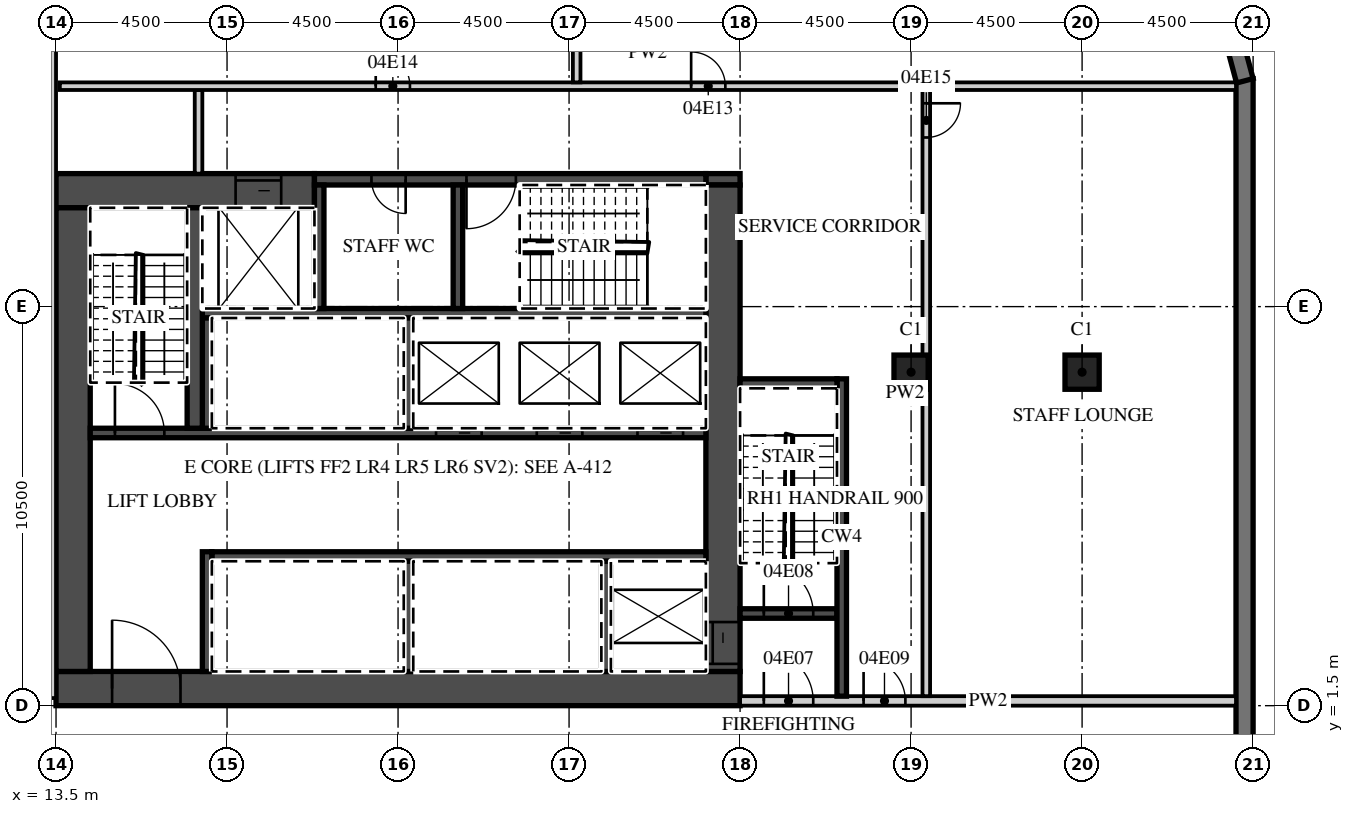
"""IFC4 building model, lengths in metres.
Left out: names, types, materials, properties, quantities, classifications, styles, units other than length and angle.
Written with IfcOpenShell. Run it as: python <this file> out.ifc"""

import sys

from ifc_helpers import new_model, si_unit, direction, frame, frame_2d, origin, origin_2d, place, context, subcontext, project, spatial, polyline, rectangle, outline, extrude, element, fill, save


model = new_model("IFC4")
c1 = context("Model", 3, precision=1e-05, world=origin(), true_north=direction((0.0, 1.0)))
c2 = subcontext(c1, "Body", "Model", "MODEL_VIEW")
j1 = project(units=[si_unit("LENGTHUNIT", "METRE"), si_unit("PLANEANGLEUNIT", "RADIAN")], contexts=[c1])
p1 = place(None, origin())
s1 = spatial("IfcSite", under=j1, at=p1, CompositionType="ELEMENT")
p2 = place(p1, origin())
s2 = spatial("IfcBuilding", under=s1, at=p2, CompositionType="ELEMENT")
p3 = place(p2, frame((0.0, 0.0, 29.0)))
s3 = spatial("IfcBuildingStorey", under=s2, at=p3, CompositionType="ELEMENT", Elevation=29.0)
for number, where, z_axis, x_axis in (
    (1, (36.0, 10.275, 0.0), (0.0, 0.0, 1.0), (1.0, 0.0, 0.0)),
    (2, (40.5, 10.275, 0.0), (0.0, 0.0, 1.0), (1.0, 0.0, 0.0)),
):
    element("IfcColumn", number, at=place(p3, frame(where, z_axis=z_axis, x_axis=x_axis)), inside=s3, PredefinedType="COLUMN", context=c2, shape_type="SweptSolid", body=[
        extrude(rectangle(XDim=0.9, YDim=0.9, at=origin_2d()), origin(), (0.0, 0.0, 1.0), 4.5),
    ])
p4 = place(p3, frame((44.775, -18.0, 0.0), z_axis=(0.0, 0.0, 1.0), x_axis=(0.0, 1.0, 0.0)))
e3 = element("IfcWall", 3, at=p4, inside=s3, PredefinedType="SOLIDWALL", context=c2, shape_type="SweptSolid", body=[
    extrude(rectangle(XDim=36.0, YDim=0.45, at=frame_2d((18.0, 0.0))), origin(), (0.0, 0.0, 1.0), 4.05),
])
p5 = place(p4, frame((4.05, 0.0, 0.9)))
e4 = element("IfcOpeningElement", 4, at=p5, cuts=e3, PredefinedType="OPENING", context=c2, shape_type="SweptSolid", body=[
    extrude(rectangle(XDim=3.0, YDim=1.8, at=frame_2d((1.5, 0.9))), frame((0.0, 0.235, 0.0), z_axis=(0.0, -1.0, 0.0), x_axis=(1.0, 0.0, 0.0)), (0.0, 0.0, 1.0), 0.47),
])
p6 = place(p3, frame((44.783, 17.942, 0.0), z_axis=(0.0, 0.0, 1.0), x_axis=(-0.25881466832, 0.965926999034, 0.0)))
e5 = element("IfcWall", 5, at=p6, inside=s3, PredefinedType="SOLIDWALL", context=c2, shape_type="SweptSolid", body=[
    extrude(outline(polyline([(0.0, -0.225), (2.071, -0.225), (1.95, 0.225), (0.121, 0.225), (0.0, -0.225)])), origin(), (0.0, 0.0, 1.0), 4.05),
])
p7 = place(p3, frame((13.5, 1.95, 0.0), z_axis=(0.0, 0.0, 1.0), x_axis=(1.0, 0.0, 0.0)))
e6 = element("IfcWall", 6, at=p7, inside=s3, PredefinedType="SHEAR", context=c2, shape_type="SweptSolid", body=[
    extrude(rectangle(XDim=18.0, YDim=0.9, at=frame_2d((9.0, 0.0))), origin(), (0.0, 0.0, 1.0), 4.05),
])
p8 = place(p7, frame((1.475, 0.0, 0.0)))
e7 = element("IfcOpeningElement", 7, at=p8, cuts=e6, PredefinedType="OPENING", context=c2, shape_type="SweptSolid", body=[
    extrude(rectangle(XDim=1.8, YDim=2.1, at=frame_2d((0.9, 1.05))), frame((0.0, 0.46, 0.0), z_axis=(0.0, -1.0, 0.0), x_axis=(1.0, 0.0, 0.0)), (0.0, 0.0, 1.0), 0.92),
])
p9 = place(p3, frame((13.5, 15.05, 0.0), z_axis=(0.0, 0.0, 1.0), x_axis=(1.0, 0.0, 0.0)))
e8 = element("IfcWall", 8, at=p9, inside=s3, PredefinedType="SHEAR", context=c2, shape_type="SweptSolid", body=[
    extrude(rectangle(XDim=6.8, YDim=0.9, at=frame_2d((3.4, 0.0))), origin(), (0.0, 0.0, 1.0), 4.05),
])
p10 = place(p9, frame((4.725, 0.0, 0.0)))
e9 = element("IfcOpeningElement", 9, at=p10, cuts=e8, PredefinedType="OPENING", context=c2, shape_type="SweptSolid", body=[
    extrude(rectangle(XDim=1.2, YDim=2.1, at=frame_2d((0.6, 1.05))), frame((0.0, 0.46, 0.0), z_axis=(0.0, -1.0, 0.0), x_axis=(1.0, 0.0, 0.0)), (0.0, 0.0, 1.0), 0.92),
])
p11 = place(p3, frame((30.6, 15.35, 0.0), z_axis=(0.0, 0.0, 1.0), x_axis=(1.0, 0.0, 0.0)))
e10 = element("IfcWall", 10, at=p11, inside=s3, PredefinedType="SHEAR", context=c2, shape_type="SweptSolid", body=[
    extrude(rectangle(XDim=0.9, YDim=0.3, at=frame_2d((0.45, 0.0))), origin(), (0.0, 0.0, 1.0), 4.05),
])
p12 = place(p3, frame((20.3, 15.35, 0.0), z_axis=(0.0, 0.0, 1.0), x_axis=(1.0, 0.0, 0.0)))
e11 = element("IfcWall", 11, at=p12, inside=s3, PredefinedType="SHEAR", context=c2, shape_type="SweptSolid", body=[
    extrude(rectangle(XDim=10.3, YDim=0.3, at=frame_2d((5.15, 0.0))), origin(), (0.0, 0.0, 1.0), 4.05),
])
p13 = place(p12, frame((4.0, 0.0, 0.0)))
e12 = element("IfcOpeningElement", 12, at=p13, cuts=e11, PredefinedType="OPENING", context=c2, shape_type="SweptSolid", body=[
    extrude(rectangle(XDim=1.3, YDim=2.1, at=frame_2d((0.65, 1.05))), frame((0.0, 0.16, 0.0), z_axis=(0.0, -1.0, 0.0), x_axis=(1.0, 0.0, 0.0)), (0.0, 0.0, 1.0), 0.32),
])
p14 = place(p12, frame((1.5, 0.0, 0.0)))
e13 = element("IfcOpeningElement", 13, at=p14, cuts=e11, PredefinedType="OPENING", context=c2, shape_type="SweptSolid", body=[
    extrude(rectangle(XDim=0.9, YDim=2.1, at=frame_2d((0.45, 1.05))), frame((0.0, 0.16, 0.0), z_axis=(0.0, -1.0, 0.0), x_axis=(1.0, 0.0, 0.0)), (0.0, 0.0, 1.0), 0.32),
])
p15 = place(p3, frame((31.05, 2.4, 0.0), z_axis=(0.0, 0.0, 1.0), x_axis=(0.0, 1.0, 0.0)))
e14 = element("IfcWall", 14, at=p15, inside=s3, PredefinedType="SHEAR", context=c2, shape_type="SweptSolid", body=[
    extrude(rectangle(XDim=12.8, YDim=0.9, at=frame_2d((6.4, 0.0))), origin(), (0.0, 0.0, 1.0), 4.05),
])
p16 = place(p15, frame((0.2, 0.0, 0.0)))
e15 = element("IfcOpeningElement", 15, at=p16, cuts=e14, PredefinedType="OPENING", context=c2, shape_type="SweptSolid", body=[
    extrude(rectangle(XDim=1.1, YDim=2.1, at=frame_2d((0.55, 1.05))), frame((0.0, 0.46, 0.0), z_axis=(0.0, -1.0, 0.0), x_axis=(1.0, 0.0, 0.0)), (0.0, 0.0, 1.0), 0.92),
])
p17 = place(p3, frame((13.95, 2.4, 0.0), z_axis=(0.0, 0.0, 1.0), x_axis=(0.0, 1.0, 0.0)))
e16 = element("IfcWall", 16, at=p17, inside=s3, PredefinedType="SHEAR", context=c2, shape_type="SweptSolid", body=[
    extrude(rectangle(XDim=12.2, YDim=0.9, at=frame_2d((6.1, 0.0))), origin(), (0.0, 0.0, 1.0), 4.05),
])
p18 = place(p3, frame((17.6, 5.425, 0.0), z_axis=(0.0, 0.0, 1.0), x_axis=(1.0, 0.0, 0.0)))
e17 = element("IfcWall", 17, at=p18, inside=s3, PredefinedType="SHEAR", context=c2, shape_type="SweptSolid", body=[
    extrude(rectangle(XDim=13.0, YDim=0.25, at=frame_2d((6.5, 0.0))), origin(), (0.0, 0.0, 1.0), 4.05),
])
p19 = place(p3, frame((17.475, 2.4, 0.0), z_axis=(0.0, 0.0, 1.0), x_axis=(0.0, 1.0, 0.0)))
e18 = element("IfcWall", 18, at=p19, inside=s3, PredefinedType="SHEAR", context=c2, shape_type="SweptSolid", body=[
    extrude(rectangle(XDim=3.15, YDim=0.25, at=frame_2d((1.575, 0.0))), origin(), (0.0, 0.0, 1.0), 4.05),
])
for number, where, z_axis, x_axis in (
    (19, (27.975, 2.4, 0.0), (0.0, 0.0, 1.0), (0.0, 1.0, 0.0)),
    (20, (22.775, 2.4, 0.0), (0.0, 0.0, 1.0), (0.0, 1.0, 0.0)),
):
    element("IfcWall", number, at=place(p3, frame(where, z_axis=z_axis, x_axis=x_axis)), inside=s3, PredefinedType="SHEAR", context=c2, shape_type="SweptSolid", body=[
        extrude(rectangle(XDim=2.9, YDim=0.25, at=frame_2d((1.45, 0.0))), origin(), (0.0, 0.0, 1.0), 4.05),
    ])
p20 = place(p3, frame((14.4, 8.675, 0.0), z_axis=(0.0, 0.0, 1.0), x_axis=(1.0, 0.0, 0.0)))
e21 = element("IfcWall", 21, at=p20, inside=s3, PredefinedType="SHEAR", context=c2, shape_type="SweptSolid", body=[
    extrude(rectangle(XDim=16.2, YDim=0.25, at=frame_2d((8.1, 0.0))), origin(), (0.0, 0.0, 1.0), 4.05),
])
p21 = place(p20, frame((14.4, 0.0, 0.0)))
e22 = element("IfcOpeningElement", 22, at=p21, cuts=e21, PredefinedType="OPENING", context=c2, shape_type="SweptSolid", body=[
    extrude(rectangle(XDim=1.2, YDim=2.1, at=frame_2d((0.6, 1.05))), frame((0.0, 0.135, 0.0), z_axis=(0.0, -1.0, 0.0), x_axis=(1.0, 0.0, 0.0)), (0.0, 0.0, 1.0), 0.27),
])
p22 = place(p20, frame((11.75, 0.0, 0.0)))
e23 = element("IfcOpeningElement", 23, at=p22, cuts=e21, PredefinedType="OPENING", context=c2, shape_type="SweptSolid", body=[
    extrude(rectangle(XDim=1.2, YDim=2.1, at=frame_2d((0.6, 1.05))), frame((0.0, 0.135, 0.0), z_axis=(0.0, -1.0, 0.0), x_axis=(1.0, 0.0, 0.0)), (0.0, 0.0, 1.0), 0.27),
])
p23 = place(p20, frame((9.1, 0.0, 0.0)))
e24 = element("IfcOpeningElement", 24, at=p23, cuts=e21, PredefinedType="OPENING", context=c2, shape_type="SweptSolid", body=[
    extrude(rectangle(XDim=1.2, YDim=2.1, at=frame_2d((0.6, 1.05))), frame((0.0, 0.135, 0.0), z_axis=(0.0, -1.0, 0.0), x_axis=(1.0, 0.0, 0.0)), (0.0, 0.0, 1.0), 0.27),
])
p24 = place(p20, frame((0.65, 0.0, 0.0)))
e25 = element("IfcOpeningElement", 25, at=p24, cuts=e21, PredefinedType="OPENING", context=c2, shape_type="SweptSolid", body=[
    extrude(rectangle(XDim=1.3, YDim=2.1, at=frame_2d((0.65, 1.05))), frame((0.0, 0.135, 0.0), z_axis=(0.0, -1.0, 0.0), x_axis=(1.0, 0.0, 0.0)), (0.0, 0.0, 1.0), 0.27),
])
p25 = place(p3, frame((17.35, 11.825, 0.0), z_axis=(0.0, 0.0, 1.0), x_axis=(1.0, 0.0, 0.0)))
e26 = element("IfcWall", 26, at=p25, inside=s3, PredefinedType="SHEAR", context=c2, shape_type="SweptSolid", body=[
    extrude(rectangle(XDim=13.25, YDim=0.25, at=frame_2d((6.625, 0.0))), origin(), (0.0, 0.0, 1.0), 4.05),
])
for number, where, z_axis, x_axis in (
    (27, (17.475, 8.8, 0.0), (0.0, 0.0, 1.0), (0.0, 1.0, 0.0)),
    (28, (22.775, 8.8, 0.0), (0.0, 0.0, 1.0), (0.0, 1.0, 0.0)),
):
    element("IfcWall", number, at=place(p3, frame(where, z_axis=z_axis, x_axis=x_axis)), inside=s3, PredefinedType="SHEAR", context=c2, shape_type="SweptSolid", body=[
        extrude(rectangle(XDim=2.9, YDim=0.25, at=frame_2d((1.45, 0.0))), origin(), (0.0, 0.0, 1.0), 4.05),
    ])
p26 = place(p3, frame((17.15, 8.8, 0.0), z_axis=(0.0, 0.0, 1.0), x_axis=(0.0, 1.0, 0.0)))
e29 = element("IfcWall", 29, at=p26, inside=s3, PredefinedType="SHEAR", context=c2, shape_type="SweptSolid", body=[
    extrude(rectangle(XDim=5.8, YDim=0.4, at=frame_2d((2.9, 0.0))), origin(), (0.0, 0.0, 1.0), 4.05),
])
for number, where, z_axis, x_axis in (
    (30, (20.425, 11.95, 0.0), (0.0, 0.0, 1.0), (0.0, 1.0, 0.0)),
    (31, (24.075, 11.95, 0.0), (0.0, 0.0, 1.0), (0.0, 1.0, 0.0)),
):
    element("IfcWall", number, at=place(p3, frame(where, z_axis=z_axis, x_axis=x_axis)), inside=s3, PredefinedType="SHEAR", context=c2, shape_type="SweptSolid", body=[
        extrude(rectangle(XDim=3.25, YDim=0.25, at=frame_2d((1.625, 0.0))), origin(), (0.0, 0.0, 1.0), 4.05),
    ])
p27 = place(p3, frame((31.5, 1.625, 0.0), z_axis=(0.0, 0.0, 1.0), x_axis=(1.0, 0.0, 0.0)))
e32 = element("IfcWall", 32, at=p27, inside=s3, PredefinedType="PARTITIONING", context=c2, shape_type="SweptSolid", body=[
    extrude(rectangle(XDim=13.05, YDim=0.25, at=frame_2d((6.525, 0.0))), origin(), (0.0, 0.0, 1.0), 4.05),
])
p28 = place(p27, frame((0.625, 0.0, 0.0)))
e33 = element("IfcOpeningElement", 33, at=p28, cuts=e32, PredefinedType="OPENING", context=c2, shape_type="SweptSolid", body=[
    extrude(rectangle(XDim=1.3, YDim=2.1, at=frame_2d((0.65, 1.05))), frame((0.0, 0.135, 0.0), z_axis=(0.0, -1.0, 0.0), x_axis=(1.0, 0.0, 0.0)), (0.0, 0.0, 1.0), 0.27),
])
p29 = place(p27, frame((3.25, 0.0, 0.0)))
e34 = element("IfcOpeningElement", 34, at=p29, cuts=e32, PredefinedType="OPENING", context=c2, shape_type="SweptSolid", body=[
    extrude(rectangle(XDim=1.1, YDim=2.1, at=frame_2d((0.55, 1.05))), frame((0.0, 0.135, 0.0), z_axis=(0.0, -1.0, 0.0), x_axis=(1.0, 0.0, 0.0)), (0.0, 0.0, 1.0), 0.27),
])
p30 = place(p3, frame((31.5, 3.925, 0.0), z_axis=(0.0, 0.0, 1.0), x_axis=(1.0, 0.0, 0.0)))
e35 = element("IfcWall", 35, at=p30, inside=s3, PredefinedType="SHEAR", context=c2, shape_type="SweptSolid", body=[
    extrude(rectangle(XDim=2.55, YDim=0.25, at=frame_2d((1.275, 0.0))), origin(), (0.0, 0.0, 1.0), 4.05),
])
p31 = place(p30, frame((0.625, 0.0, 0.0)))
e36 = element("IfcOpeningElement", 36, at=p31, cuts=e35, PredefinedType="OPENING", context=c2, shape_type="SweptSolid", body=[
    extrude(rectangle(XDim=1.3, YDim=2.1, at=frame_2d((0.65, 1.05))), frame((0.0, 0.135, 0.0), z_axis=(0.0, -1.0, 0.0), x_axis=(1.0, 0.0, 0.0)), (0.0, 0.0, 1.0), 0.27),
])
p32 = place(p3, frame((34.175, 1.75, 0.0), z_axis=(0.0, 0.0, 1.0), x_axis=(0.0, 1.0, 0.0)))
e37 = element("IfcWall", 37, at=p32, inside=s3, PredefinedType="SHEAR", context=c2, shape_type="SweptSolid", body=[
    extrude(rectangle(XDim=8.35, YDim=0.25, at=frame_2d((4.175, 0.0))), origin(), (0.0, 0.0, 1.0), 4.05),
])
p33 = place(p3, frame((31.5, 9.975, 0.0), z_axis=(0.0, 0.0, 1.0), x_axis=(1.0, 0.0, 0.0)))
e38 = element("IfcWall", 38, at=p33, inside=s3, PredefinedType="SHEAR", context=c2, shape_type="SweptSolid", body=[
    extrude(rectangle(XDim=2.55, YDim=0.25, at=frame_2d((1.275, 0.0))), origin(), (0.0, 0.0, 1.0), 4.05),
])
p34 = place(p3, frame((17.25, 15.5, 0.0), z_axis=(0.0, 0.0, 1.0), x_axis=(0.0, 1.0, 0.0)))
e39 = element("IfcWall", 39, at=p34, inside=s3, PredefinedType="PARTITIONING", context=c2, shape_type="SweptSolid", body=[
    extrude(rectangle(XDim=2.2, YDim=0.2, at=frame_2d((1.1, 0.0))), origin(), (0.0, 0.0, 1.0), 4.05),
])
p35 = place(p3, frame((36.4, 1.75, 0.0), z_axis=(0.0, 0.0, 1.0), x_axis=(0.0, 1.0, 0.0)))
e40 = element("IfcWall", 40, at=p35, inside=s3, PredefinedType="PARTITIONING", context=c2, shape_type="SweptSolid", body=[
    extrude(rectangle(XDim=15.95, YDim=0.2, at=frame_2d((7.975, 0.0))), origin(), (0.0, 0.0, 1.0), 4.05),
])
p36 = place(p35, frame((14.7, 0.0, 0.0)))
e41 = element("IfcOpeningElement", 41, at=p36, cuts=e40, PredefinedType="OPENING", context=c2, shape_type="SweptSolid", body=[
    extrude(rectangle(XDim=0.9, YDim=2.1, at=frame_2d((0.45, 1.05))), frame((0.0, 0.11, 0.0), z_axis=(0.0, -1.0, 0.0), x_axis=(1.0, 0.0, 0.0)), (0.0, 0.0, 1.0), 0.22),
])
p37 = place(p3, frame((13.6, 17.8, 0.0), z_axis=(0.0, 0.0, 1.0), x_axis=(1.0, 0.0, 0.0)))
e42 = element("IfcWall", 42, at=p37, inside=s3, PredefinedType="PARTITIONING", context=c2, shape_type="SweptSolid", body=[
    extrude(rectangle(XDim=30.95, YDim=0.2, at=frame_2d((15.475, 0.0))), origin(), (0.0, 0.0, 1.0), 4.05),
])
p38 = place(p37, frame((16.613, 0.0, 0.0)))
e43 = element("IfcOpeningElement", 43, at=p38, cuts=e42, PredefinedType="OPENING", context=c2, shape_type="SweptSolid", body=[
    extrude(rectangle(XDim=0.9, YDim=2.1, at=frame_2d((0.45, 1.05))), frame((0.0, 0.11, 0.0), z_axis=(0.0, -1.0, 0.0), x_axis=(1.0, 0.0, 0.0)), (0.0, 0.0, 1.0), 0.22),
])
p39 = place(p37, frame((8.312, 0.0, 0.0)))
e44 = element("IfcOpeningElement", 44, at=p39, cuts=e42, PredefinedType="OPENING", context=c2, shape_type="SweptSolid", body=[
    extrude(rectangle(XDim=0.9, YDim=2.1, at=frame_2d((0.45, 1.05))), frame((0.0, 0.11, 0.0), z_axis=(0.0, -1.0, 0.0), x_axis=(1.0, 0.0, 0.0)), (0.0, 0.0, 1.0), 0.22),
])
p40 = place(p3, frame((27.2, 17.9, 0.0), z_axis=(0.0, 0.0, 1.0), x_axis=(0.0, 1.0, 0.0)))
e45 = element("IfcWall", 45, at=p40, inside=s3, PredefinedType="PARTITIONING", context=c2, shape_type="SweptSolid", body=[
    extrude(rectangle(XDim=3.65, YDim=0.2, at=frame_2d((1.825, 0.0))), origin(), (0.0, 0.0, 1.0), 4.05),
])
p41 = place(p3, frame((13.4, 1.7, 0.0), z_axis=(0.0, 0.0, 1.0), x_axis=(0.0, 1.0, 0.0)))
e46 = element("IfcWall", 46, at=p41, inside=s3, PredefinedType="PARTITIONING", context=c2, shape_type="SweptSolid", body=[
    extrude(rectangle(XDim=19.85, YDim=0.2, at=frame_2d((9.925, 0.0))), origin(), (0.0, 0.0, 1.0), 4.05),
])
p42 = place(p21, origin())
e47 = element("IfcDoor", 47, at=p42, inside=s3, OperationType="SLIDING_TO_LEFT", PredefinedType="DOOR", context=c2, shape_type="SweptSolid", body=[
    extrude(rectangle(XDim=1.2, YDim=2.1, at=frame_2d((0.6, 1.05))), frame((0.0, 0.025, 0.0), z_axis=(0.0, -1.0, 0.0), x_axis=(1.0, 0.0, 0.0)), (0.0, 0.0, 1.0), 0.05),
])
fill(e22, e47)
p43 = place(p22, origin())
e48 = element("IfcDoor", 48, at=p43, inside=s3, OperationType="SLIDING_TO_RIGHT", PredefinedType="DOOR", context=c2, shape_type="SweptSolid", body=[
    extrude(rectangle(XDim=1.2, YDim=2.1, at=frame_2d((0.6, 1.05))), frame((0.0, 0.025, 0.0), z_axis=(0.0, -1.0, 0.0), x_axis=(1.0, 0.0, 0.0)), (0.0, 0.0, 1.0), 0.05),
])
fill(e23, e48)
p44 = place(p23, origin())
e49 = element("IfcDoor", 49, at=p44, inside=s3, OperationType="SLIDING_TO_RIGHT", PredefinedType="DOOR", context=c2, shape_type="SweptSolid", body=[
    extrude(rectangle(XDim=1.2, YDim=2.1, at=frame_2d((0.6, 1.05))), frame((0.0, 0.025, 0.0), z_axis=(0.0, -1.0, 0.0), x_axis=(1.0, 0.0, 0.0)), (0.0, 0.0, 1.0), 0.05),
])
fill(e24, e49)
p45 = place(p10, origin())
e50 = element("IfcDoor", 50, at=p45, inside=s3, OperationType="SLIDING_TO_LEFT", PredefinedType="DOOR", context=c2, shape_type="SweptSolid", body=[
    extrude(rectangle(XDim=1.2, YDim=2.1, at=frame_2d((0.6, 1.05))), frame((0.0, 0.025, 0.0), z_axis=(0.0, -1.0, 0.0), x_axis=(1.0, 0.0, 0.0)), (0.0, 0.0, 1.0), 0.05),
])
fill(e9, e50)
p46 = place(p16, origin())
e51 = element("IfcDoor", 51, at=p46, inside=s3, OperationType="SLIDING_TO_LEFT", PredefinedType="DOOR", context=c2, shape_type="SweptSolid", body=[
    extrude(rectangle(XDim=1.1, YDim=2.1, at=frame_2d((0.55, 1.05))), frame((0.0, 0.025, 0.0), z_axis=(0.0, -1.0, 0.0), x_axis=(1.0, 0.0, 0.0)), (0.0, 0.0, 1.0), 0.05),
])
fill(e15, e51)
p47 = place(p8, origin())
e52 = element("IfcDoor", 52, at=p47, inside=s3, OperationType="DOUBLE_DOOR_DOUBLE_SWING", PredefinedType="DOOR", context=c2, shape_type="SweptSolid", body=[
    extrude(rectangle(XDim=1.8, YDim=2.1, at=frame_2d((0.9, 1.05))), frame((0.0, 0.025, 0.0), z_axis=(0.0, -1.0, 0.0), x_axis=(1.0, 0.0, 0.0)), (0.0, 0.0, 1.0), 0.05),
])
fill(e7, e52)
p48 = place(p28, origin())
e53 = element("IfcDoor", 53, at=p48, inside=s3, OperationType="SINGLE_SWING_LEFT", PredefinedType="DOOR", context=c2, shape_type="SweptSolid", body=[
    extrude(rectangle(XDim=1.3, YDim=2.1, at=frame_2d((0.65, 1.05))), frame((0.0, 0.025, 0.0), z_axis=(0.0, -1.0, 0.0), x_axis=(1.0, 0.0, 0.0)), (0.0, 0.0, 1.0), 0.05),
])
fill(e33, e53)
p49 = place(p31, origin())
e54 = element("IfcDoor", 54, at=p49, inside=s3, OperationType="SINGLE_SWING_LEFT", PredefinedType="DOOR", context=c2, shape_type="SweptSolid", body=[
    extrude(rectangle(XDim=1.3, YDim=2.1, at=frame_2d((0.65, 1.05))), frame((0.0, 0.025, 0.0), z_axis=(0.0, -1.0, 0.0), x_axis=(1.0, 0.0, 0.0)), (0.0, 0.0, 1.0), 0.05),
])
fill(e36, e54)
p50 = place(p29, origin())
e55 = element("IfcDoor", 55, at=p50, inside=s3, OperationType="SINGLE_SWING_LEFT", PredefinedType="DOOR", context=c2, shape_type="SweptSolid", body=[
    extrude(rectangle(XDim=1.1, YDim=2.1, at=frame_2d((0.55, 1.05))), frame((0.0, 0.025, 0.0), z_axis=(0.0, -1.0, 0.0), x_axis=(1.0, 0.0, 0.0)), (0.0, 0.0, 1.0), 0.05),
])
fill(e34, e55)
p51 = place(p24, origin())
e56 = element("IfcDoor", 56, at=p51, inside=s3, OperationType="SINGLE_SWING_LEFT", PredefinedType="DOOR", context=c2, shape_type="SweptSolid", body=[
    extrude(rectangle(XDim=1.3, YDim=2.1, at=frame_2d((0.65, 1.05))), frame((0.0, 0.025, 0.0), z_axis=(0.0, -1.0, 0.0), x_axis=(1.0, 0.0, 0.0)), (0.0, 0.0, 1.0), 0.05),
])
fill(e25, e56)
p52 = place(p13, origin())
e57 = element("IfcDoor", 57, at=p52, inside=s3, OperationType="SINGLE_SWING_LEFT", PredefinedType="DOOR", context=c2, shape_type="SweptSolid", body=[
    extrude(rectangle(XDim=1.3, YDim=2.1, at=frame_2d((0.65, 1.05))), frame((0.0, 0.025, 0.0), z_axis=(0.0, -1.0, 0.0), x_axis=(1.0, 0.0, 0.0)), (0.0, 0.0, 1.0), 0.05),
])
fill(e12, e57)
p53 = place(p14, origin())
e58 = element("IfcDoor", 58, at=p53, inside=s3, OperationType="SINGLE_SWING_RIGHT", PredefinedType="DOOR", context=c2, shape_type="SweptSolid", body=[
    extrude(rectangle(XDim=0.9, YDim=2.1, at=frame_2d((0.45, 1.05))), frame((0.0, 0.025, 0.0), z_axis=(0.0, -1.0, 0.0), x_axis=(1.0, 0.0, 0.0)), (0.0, 0.0, 1.0), 0.05),
])
fill(e13, e58)
p54 = place(p38, origin())
e59 = element("IfcDoor", 59, at=p54, inside=s3, OperationType="SINGLE_SWING_LEFT", PredefinedType="DOOR", context=c2, shape_type="SweptSolid", body=[
    extrude(rectangle(XDim=0.9, YDim=2.1, at=frame_2d((0.45, 1.05))), frame((0.0, 0.025, 0.0), z_axis=(0.0, -1.0, 0.0), x_axis=(1.0, 0.0, 0.0)), (0.0, 0.0, 1.0), 0.05),
])
fill(e43, e59)
p55 = place(p39, origin())
e60 = element("IfcDoor", 60, at=p55, inside=s3, OperationType="SINGLE_SWING_LEFT", PredefinedType="DOOR", context=c2, shape_type="SweptSolid", body=[
    extrude(rectangle(XDim=0.9, YDim=2.1, at=frame_2d((0.45, 1.05))), frame((0.0, 0.025, 0.0), z_axis=(0.0, -1.0, 0.0), x_axis=(1.0, 0.0, 0.0)), (0.0, 0.0, 1.0), 0.05),
])
fill(e44, e60)
p56 = place(p36, origin())
e61 = element("IfcDoor", 61, at=p56, inside=s3, OperationType="SINGLE_SWING_RIGHT", PredefinedType="DOOR", context=c2, shape_type="SweptSolid", body=[
    extrude(rectangle(XDim=0.9, YDim=2.1, at=frame_2d((0.45, 1.05))), frame((0.0, 0.025, 0.0), z_axis=(0.0, -1.0, 0.0), x_axis=(1.0, 0.0, 0.0)), (0.0, 0.0, 1.0), 0.05),
])
fill(e41, e61)
save(model, sys.argv[1])
